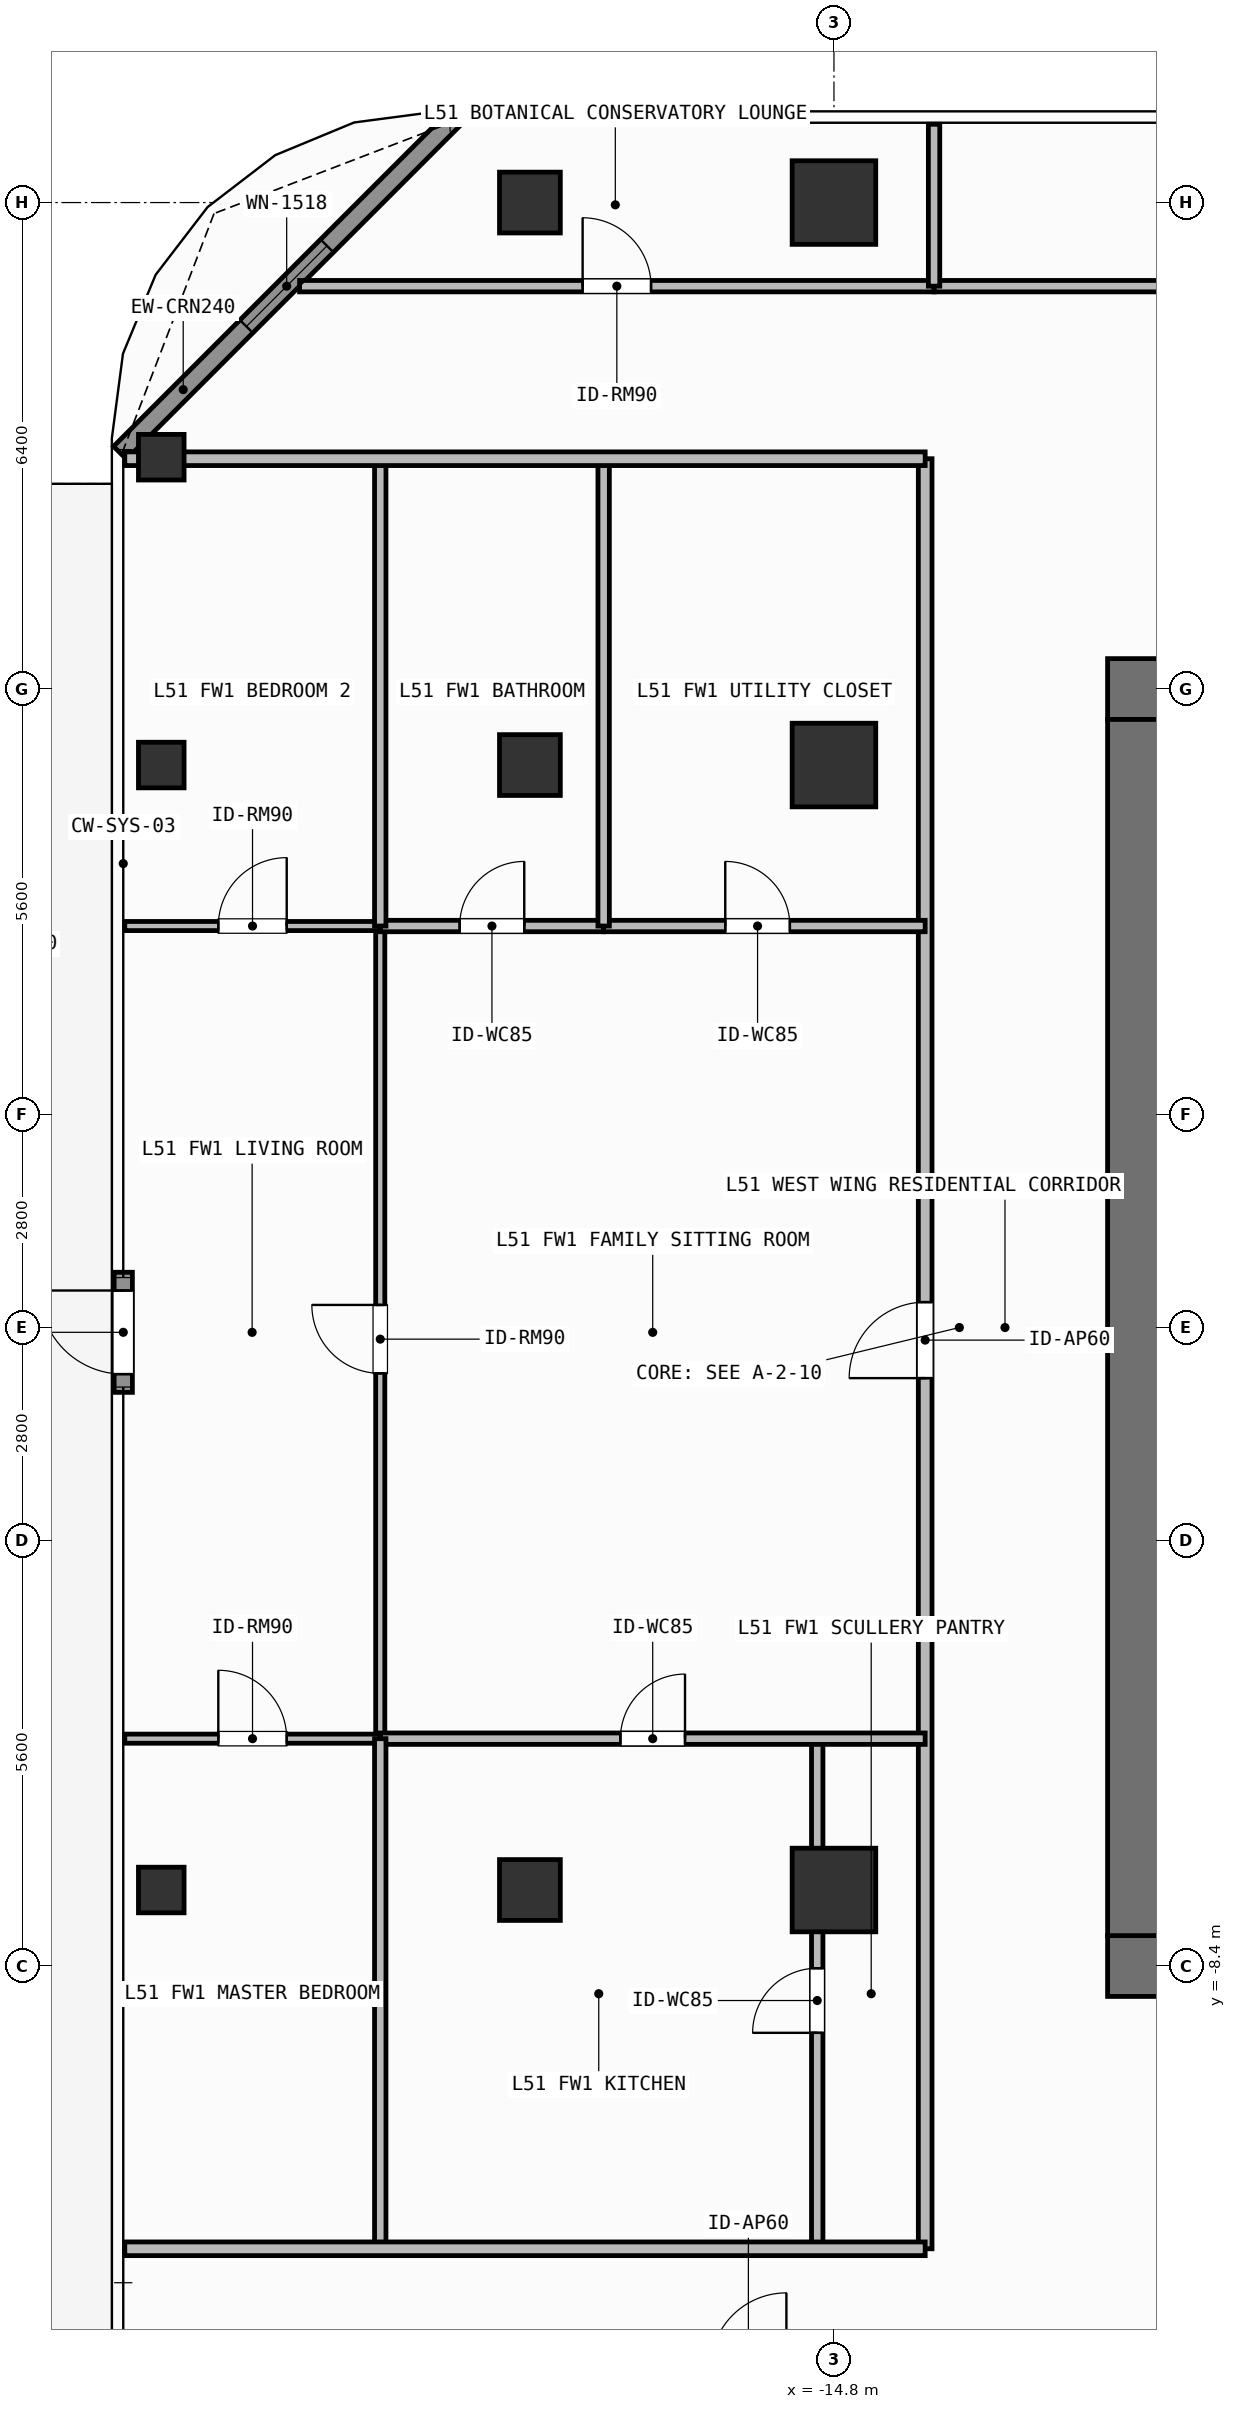
"""IFC4 building model, lengths in metres.
Left out: names, types, materials, properties, quantities, classifications, styles, units other than length and angle.
Written with IfcOpenShell. Run it as: python <this file> out.ifc"""

import sys

from ifc_helpers import new_model, si_unit, direction, frame, frame_2d, origin, origin_2d, place, context, subcontext, project, spatial, rectangle, hollow_rectangle, extrude, element, fill, save


model = new_model("IFC4")
c1 = context("Model", 3, precision=1e-05, world=origin(), true_north=direction((0.0, 1.0)))
c2 = subcontext(c1, "Body", "Model", "MODEL_VIEW")
j1 = project(units=[si_unit("LENGTHUNIT", "METRE"), si_unit("PLANEANGLEUNIT", "RADIAN")], contexts=[c1])
p1 = place(None, origin())
s1 = spatial("IfcSite", under=j1, at=p1, CompositionType="ELEMENT")
p2 = place(p1, origin())
s2 = spatial("IfcBuilding", under=s1, at=p2, CompositionType="ELEMENT")
p3 = place(p2, frame((0.0, 0.0, 207.0)))
s3 = spatial("IfcBuildingStorey", under=s2, at=p3, CompositionType="ELEMENT", Elevation=207.0)
for number, where, z_axis, x_axis in (
    (1, (-11.2, -8.4, 0.0), (0.0, 0.0, 1.0), (1.0, 0.0, 0.0)),
    (2, (-11.2, 8.4, 0.0), (0.0, 0.0, 1.0), (1.0, 0.0, 0.0)),
):
    element("IfcWall", number, at=place(p3, frame(where, z_axis=z_axis, x_axis=x_axis)), inside=s3, PredefinedType="SHEAR", context=c2, shape_type="SweptSolid", body=[
        extrude(rectangle(XDim=1.5, YDim=0.8, at=frame_2d((0.75, 0.0))), origin(), (0.0, 0.0, 1.0), 3.9),
    ])
p4 = place(p3, frame((-10.8, -8.0, 0.0), z_axis=(0.0, 0.0, 1.0), x_axis=(0.0, 1.0, 0.0)))
e3 = element("IfcWall", 3, at=p4, inside=s3, PredefinedType="SHEAR", context=c2, shape_type="SweptSolid", body=[
    extrude(rectangle(XDim=16.0, YDim=0.8, at=frame_2d((8.0, 0.0))), origin(), (0.0, 0.0, 1.0), 3.9),
])
for number, where, z_axis, x_axis in (
    (4, (-14.8, 14.8, 0.0), (0.0, 0.0, 1.0), (1.0, 0.0, 0.0)),
    (5, (-14.8, -7.4, 0.0), (0.0, 0.0, 1.0), (1.0, 0.0, 0.0)),
    (6, (-14.8, 7.4, 0.0), (0.0, 0.0, 1.0), (1.0, 0.0, 0.0)),
):
    element("IfcColumn", number, at=place(p3, frame(where, z_axis=z_axis, x_axis=x_axis)), inside=s3, PredefinedType="COLUMN", context=c2, shape_type="SweptSolid", body=[
        extrude(rectangle(XDim=1.1, YDim=1.1, at=origin_2d()), origin(), (0.0, 0.0, 1.0), 3.9),
    ])
for number, where, z_axis, x_axis in (
    (7, (-18.8, -7.4, 0.0), (0.0, 0.0, 1.0), (1.0, 0.0, 0.0)),
    (8, (-18.8, 7.4, 0.0), (0.0, 0.0, 1.0), (1.0, 0.0, 0.0)),
    (9, (-18.8, 14.8, 0.0), (0.0, 0.0, 1.0), (1.0, 0.0, 0.0)),
):
    element("IfcColumn", number, at=place(p3, frame(where, z_axis=z_axis, x_axis=x_axis)), inside=s3, PredefinedType="COLUMN", context=c2, shape_type="SweptSolid", body=[
        extrude(hollow_rectangle(XDim=0.8, YDim=0.8, WallThickness=0.036, at=origin_2d()), origin(), (0.0, 0.0, 1.0), 3.9),
    ])
for number, where, z_axis, x_axis in (
    (10, (-23.65, 11.45, 0.0), (0.0, 0.0, 1.0), (1.0, 0.0, 0.0)),
    (11, (-23.65, -7.4, 0.0), (0.0, 0.0, 1.0), (1.0, 0.0, 0.0)),
    (12, (-23.65, 7.4, 0.0), (0.0, 0.0, 1.0), (1.0, 0.0, 0.0)),
):
    element("IfcColumn", number, at=place(p3, frame(where, z_axis=z_axis, x_axis=x_axis)), inside=s3, PredefinedType="COLUMN", context=c2, shape_type="SweptSolid", body=[
        extrude(hollow_rectangle(XDim=0.6, YDim=0.6, WallThickness=0.028, at=origin_2d()), origin(), (0.0, 0.0, 1.0), 3.9),
    ])
p5 = place(p3, frame((-24.15, -0.853, 0.0), z_axis=(0.0, 0.0, 1.0), x_axis=(0.0, 1.0, 0.0)))
e13 = element("IfcWall", 13, at=p5, inside=s3, PredefinedType="SOLIDWALL", context=c2, shape_type="SweptSolid", body=[
    extrude(rectangle(XDim=1.58, YDim=0.24, at=frame_2d((0.79, 0.0))), origin(), (0.0, 0.0, 1.0), 3.62),
])
p6 = place(p5, frame((0.24, 0.0, 0.0)))
e14 = element("IfcOpeningElement", 14, at=p6, cuts=e13, PredefinedType="OPENING", context=c2, shape_type="SweptSolid", body=[
    extrude(rectangle(XDim=1.1, YDim=2.2, at=frame_2d((0.55, 1.1))), frame((0.0, 0.13, 0.0), z_axis=(0.0, -1.0, 0.0), x_axis=(1.0, 0.0, 0.0)), (0.0, 0.0, 1.0), 0.26),
])
p7 = place(p3, frame((-24.192, 11.508, 0.0), z_axis=(0.0, 0.0, 1.0), x_axis=(0.707106781187, 0.707106781187, 0.0)))
e15 = element("IfcWall", 15, at=p7, inside=s3, PredefinedType="SOLIDWALL", context=c2, shape_type="SweptSolid", body=[
    extrude(rectangle(XDim=6.201, YDim=0.24, at=frame_2d((3.101, 0.0))), origin(), (0.0, 0.0, 1.0), 3.62),
])
p8 = place(p7, frame((2.351, 0.0, 0.8)))
e16 = element("IfcOpeningElement", 16, at=p8, cuts=e15, PredefinedType="OPENING", context=c2, shape_type="SweptSolid", body=[
    extrude(rectangle(XDim=1.5, YDim=1.85, at=frame_2d((0.75, 0.925))), frame((0.0, 0.13, 0.0), z_axis=(0.0, -1.0, 0.0), x_axis=(1.0, 0.0, 0.0)), (0.0, 0.0, 1.0), 0.26),
])
p9 = place(p3, frame((-21.83, 13.7, 0.0), z_axis=(0.0, 0.0, 1.0), x_axis=(1.0, 0.0, 0.0)))
e17 = element("IfcWall", 17, at=p9, inside=s3, PredefinedType="PARTITIONING", context=c2, shape_type="SweptSolid", body=[
    extrude(rectangle(XDim=8.347, YDim=0.15, at=frame_2d((4.174, 0.0))), origin(), (0.0, 0.0, 1.0), 3.62),
])
p10 = place(p9, frame((3.723, 0.0, 0.0)))
e18 = element("IfcOpeningElement", 18, at=p10, cuts=e17, PredefinedType="OPENING", context=c2, shape_type="SweptSolid", body=[
    extrude(rectangle(XDim=0.9, YDim=2.1, at=frame_2d((0.45, 1.05))), frame((0.0, 0.085, 0.0), z_axis=(0.0, -1.0, 0.0), x_axis=(1.0, 0.0, 0.0)), (0.0, 0.0, 1.0), 0.17),
])
p11 = place(p3, frame((-13.483, 13.7, 0.0), z_axis=(0.0, 0.0, 1.0), x_axis=(1.0, 0.0, 0.0)))
e19 = element("IfcWall", 19, at=p11, inside=s3, PredefinedType="PARTITIONING", context=c2, shape_type="SweptSolid", body=[
    extrude(rectangle(XDim=13.58, YDim=0.15, at=frame_2d((6.79, 0.0))), origin(), (0.0, 0.0, 1.0), 3.62),
])
p12 = place(p11, frame((6.788, 0.0, 0.0)))
e20 = element("IfcOpeningElement", 20, at=p12, cuts=e19, PredefinedType="OPENING", context=c2, shape_type="SweptSolid", body=[
    extrude(rectangle(XDim=0.9, YDim=2.1, at=frame_2d((0.45, 1.05))), frame((0.0, 0.085, 0.0), z_axis=(0.0, -1.0, 0.0), x_axis=(1.0, 0.0, 0.0)), (0.0, 0.0, 1.0), 0.17),
])
p13 = place(p3, frame((-13.6, -12.12, 0.0), z_axis=(0.0, 0.0, 1.0), x_axis=(0.0, 1.0, 0.0)))
e21 = element("IfcWall", 21, at=p13, inside=s3, PredefinedType="PARTITIONING", context=c2, shape_type="SweptSolid", body=[
    extrude(rectangle(XDim=23.55, YDim=0.18, at=frame_2d((11.775, 0.0))), origin(), (0.0, 0.0, 1.0), 3.62),
])
p14 = place(p13, frame((11.454, 0.0, 0.0)))
e22 = element("IfcOpeningElement", 22, at=p14, cuts=e21, PredefinedType="OPENING", context=c2, shape_type="SweptSolid", body=[
    extrude(rectangle(XDim=1.0, YDim=2.2, at=frame_2d((0.5, 1.1))), frame((0.0, 0.1, 0.0), z_axis=(0.0, -1.0, 0.0), x_axis=(1.0, 0.0, 0.0)), (0.0, 0.0, 1.0), 0.2),
])
p15 = place(p3, frame((-20.769, -5.409, 0.0), z_axis=(0.0, 0.0, 1.0), x_axis=(0.0, 1.0, 0.0)))
e23 = element("IfcWall", 23, at=p15, inside=s3, PredefinedType="PARTITIONING", context=c2, shape_type="SweptSolid", body=[
    extrude(rectangle(XDim=10.691, YDim=0.12, at=frame_2d((5.345, 0.0))), origin(), (0.0, 0.0, 1.0), 3.62),
])
p16 = place(p15, frame((4.806, 0.0, 0.0)))
e24 = element("IfcOpeningElement", 24, at=p16, cuts=e23, PredefinedType="OPENING", context=c2, shape_type="SweptSolid", body=[
    extrude(rectangle(XDim=0.9, YDim=2.1, at=frame_2d((0.45, 1.05))), frame((0.0, 0.07, 0.0), z_axis=(0.0, -1.0, 0.0), x_axis=(1.0, 0.0, 0.0)), (0.0, 0.0, 1.0), 0.14),
])
p17 = place(p3, frame((-15.02, -12.12, 0.0), z_axis=(0.0, 0.0, 1.0), x_axis=(0.0, 1.0, 0.0)))
e25 = element("IfcWall", 25, at=p17, inside=s3, PredefinedType="PARTITIONING", context=c2, shape_type="SweptSolid", body=[
    extrude(rectangle(XDim=6.711, YDim=0.15, at=frame_2d((3.355, 0.0))), origin(), (0.0, 0.0, 1.0), 3.122),
])
p18 = place(p17, frame((2.841, 0.0, 0.0)))
e26 = element("IfcOpeningElement", 26, at=p18, cuts=e25, PredefinedType="OPENING", context=c2, shape_type="SweptSolid", body=[
    extrude(rectangle(XDim=0.85, YDim=2.1, at=frame_2d((0.425, 1.05))), frame((0.0, 0.085, 0.0), z_axis=(0.0, -1.0, 0.0), x_axis=(1.0, 0.0, 0.0)), (0.0, 0.0, 1.0), 0.17),
])
p19 = place(p3, frame((-20.769, 5.282, 0.0), z_axis=(0.0, 0.0, 1.0), x_axis=(1.0, 0.0, 0.0)))
e27 = element("IfcWall", 27, at=p19, inside=s3, PredefinedType="PARTITIONING", context=c2, shape_type="SweptSolid", body=[
    extrude(rectangle(XDim=2.939, YDim=0.15, at=frame_2d((1.469, 0.0))), origin(), (0.0, 0.0, 1.0), 3.62),
])
p20 = place(p19, frame((1.044, 0.0, 0.0)))
e28 = element("IfcOpeningElement", 28, at=p20, cuts=e27, PredefinedType="OPENING", context=c2, shape_type="SweptSolid", body=[
    extrude(rectangle(XDim=0.85, YDim=2.1, at=frame_2d((0.425, 1.05))), frame((0.0, 0.085, 0.0), z_axis=(0.0, -1.0, 0.0), x_axis=(1.0, 0.0, 0.0)), (0.0, 0.0, 1.0), 0.17),
])
p21 = place(p3, frame((-17.83, 5.282, 0.0), z_axis=(0.0, 0.0, 1.0), x_axis=(1.0, 0.0, 0.0)))
e29 = element("IfcWall", 29, at=p21, inside=s3, PredefinedType="PARTITIONING", context=c2, shape_type="SweptSolid", body=[
    extrude(rectangle(XDim=4.23, YDim=0.15, at=frame_2d((2.115, 0.0))), origin(), (0.0, 0.0, 1.0), 3.62),
])
p22 = place(p21, frame((1.6, 0.0, 0.0)))
e30 = element("IfcOpeningElement", 30, at=p22, cuts=e29, PredefinedType="OPENING", context=c2, shape_type="SweptSolid", body=[
    extrude(rectangle(XDim=0.85, YDim=2.1, at=frame_2d((0.425, 1.05))), frame((0.0, 0.085, 0.0), z_axis=(0.0, -1.0, 0.0), x_axis=(1.0, 0.0, 0.0)), (0.0, 0.0, 1.0), 0.17),
])
p23 = place(p3, frame((-20.769, -5.409, 0.0), z_axis=(0.0, 0.0, 1.0), x_axis=(1.0, 0.0, 0.0)))
e31 = element("IfcWall", 31, at=p23, inside=s3, PredefinedType="PARTITIONING", context=c2, shape_type="SweptSolid", body=[
    extrude(rectangle(XDim=7.169, YDim=0.15, at=frame_2d((3.584, 0.0))), origin(), (0.0, 0.0, 1.0), 3.62),
])
p24 = place(p23, frame((3.159, 0.0, 0.0)))
e32 = element("IfcOpeningElement", 32, at=p24, cuts=e31, PredefinedType="OPENING", context=c2, shape_type="SweptSolid", body=[
    extrude(rectangle(XDim=0.85, YDim=2.1, at=frame_2d((0.425, 1.05))), frame((0.0, 0.085, 0.0), z_axis=(0.0, -1.0, 0.0), x_axis=(1.0, 0.0, 0.0)), (0.0, 0.0, 1.0), 0.17),
])
p25 = place(p3, frame((-24.13, -5.409, 0.0), z_axis=(0.0, 0.0, 1.0), x_axis=(1.0, 0.0, 0.0)))
e33 = element("IfcWall", 33, at=p25, inside=s3, PredefinedType="PARTITIONING", context=c2, shape_type="SweptSolid", body=[
    extrude(rectangle(XDim=3.361, YDim=0.12, at=frame_2d((1.68, 0.0))), origin(), (0.0, 0.0, 1.0), 3.62),
])
p26 = place(p25, frame((1.23, 0.0, 0.0)))
e34 = element("IfcOpeningElement", 34, at=p26, cuts=e33, PredefinedType="OPENING", context=c2, shape_type="SweptSolid", body=[
    extrude(rectangle(XDim=0.9, YDim=2.1, at=frame_2d((0.45, 1.05))), frame((0.0, 0.07, 0.0), z_axis=(0.0, -1.0, 0.0), x_axis=(1.0, 0.0, 0.0)), (0.0, 0.0, 1.0), 0.14),
])
p27 = place(p3, frame((-24.13, 5.282, 0.0), z_axis=(0.0, 0.0, 1.0), x_axis=(1.0, 0.0, 0.0)))
e35 = element("IfcWall", 35, at=p27, inside=s3, PredefinedType="PARTITIONING", context=c2, shape_type="SweptSolid", body=[
    extrude(rectangle(XDim=3.361, YDim=0.12, at=frame_2d((1.68, 0.0))), origin(), (0.0, 0.0, 1.0), 3.62),
])
p28 = place(p27, frame((1.23, 0.0, 0.0)))
e36 = element("IfcOpeningElement", 36, at=p28, cuts=e35, PredefinedType="OPENING", context=c2, shape_type="SweptSolid", body=[
    extrude(rectangle(XDim=0.9, YDim=2.1, at=frame_2d((0.45, 1.05))), frame((0.0, 0.07, 0.0), z_axis=(0.0, -1.0, 0.0), x_axis=(1.0, 0.0, 0.0)), (0.0, 0.0, 1.0), 0.14),
])
p29 = place(p3, frame((-13.483, 13.7, 0.0), z_axis=(0.0, 0.0, 1.0), x_axis=(0.0, 1.0, 0.0)))
e37 = element("IfcWall", 37, at=p29, inside=s3, PredefinedType="PARTITIONING", context=c2, shape_type="SweptSolid", body=[
    extrude(rectangle(XDim=2.13, YDim=0.15, at=frame_2d((1.065, 0.0))), origin(), (0.0, 0.0, 1.0), 3.62),
])
p30 = place(p3, frame((-17.83, 5.282, 0.0), z_axis=(0.0, 0.0, 1.0), x_axis=(0.0, 1.0, 0.0)))
e38 = element("IfcWall", 38, at=p30, inside=s3, PredefinedType="PARTITIONING", context=c2, shape_type="SweptSolid", body=[
    extrude(rectangle(XDim=6.148, YDim=0.15, at=frame_2d((3.074, 0.0))), origin(), (0.0, 0.0, 1.0), 3.62),
])
p31 = place(p3, frame((-20.769, -12.12, 0.0), z_axis=(0.0, 0.0, 1.0), x_axis=(0.0, 1.0, 0.0)))
e39 = element("IfcWall", 39, at=p31, inside=s3, PredefinedType="PARTITIONING", context=c2, shape_type="SweptSolid", body=[
    extrude(rectangle(XDim=6.711, YDim=0.15, at=frame_2d((3.355, 0.0))), origin(), (0.0, 0.0, 1.0), 3.62),
])
p32 = place(p3, frame((-20.769, 5.282, 0.0), z_axis=(0.0, 0.0, 1.0), x_axis=(0.0, 1.0, 0.0)))
e40 = element("IfcWall", 40, at=p32, inside=s3, PredefinedType="PARTITIONING", context=c2, shape_type="SweptSolid", body=[
    extrude(rectangle(XDim=6.148, YDim=0.15, at=frame_2d((3.074, 0.0))), origin(), (0.0, 0.0, 1.0), 3.62),
])
p33 = place(p3, frame((-24.13, -12.12, 0.0), z_axis=(0.0, 0.0, 1.0), x_axis=(1.0, 0.0, 0.0)))
e41 = element("IfcWall", 41, at=p33, inside=s3, PredefinedType="PARTITIONING", context=c2, shape_type="SweptSolid", body=[
    extrude(rectangle(XDim=10.53, YDim=0.18, at=frame_2d((5.265, 0.0))), origin(), (0.0, 0.0, 1.0), 3.62),
])
p34 = place(p3, frame((-24.13, 11.43, 0.0), z_axis=(0.0, 0.0, 1.0), x_axis=(1.0, 0.0, 0.0)))
e42 = element("IfcWall", 42, at=p34, inside=s3, PredefinedType="PARTITIONING", context=c2, shape_type="SweptSolid", body=[
    extrude(rectangle(XDim=10.53, YDim=0.18, at=frame_2d((5.265, 0.0))), origin(), (0.0, 0.0, 1.0), 3.36),
])
p35 = place(p6, origin())
e43 = element("IfcDoor", 43, at=p35, inside=s3, OperationType="SINGLE_SWING_RIGHT", PredefinedType="DOOR", context=c2, shape_type="SweptSolid", body=[
    extrude(rectangle(XDim=1.1, YDim=2.2, at=frame_2d((0.55, 1.1))), frame((0.0, 0.025, 0.0), z_axis=(0.0, -1.0, 0.0), x_axis=(1.0, 0.0, 0.0)), (0.0, 0.0, 1.0), 0.05),
])
fill(e14, e43)
p36 = place(p8, origin())
e44 = element("IfcWindow", 44, at=p36, inside=s3, PartitioningType="SINGLE_PANEL", PredefinedType="WINDOW", context=c2, shape_type="SweptSolid", body=[
    extrude(rectangle(XDim=1.5, YDim=1.85, at=frame_2d((0.75, 0.925))), frame((0.0, 0.03, 0.0), z_axis=(0.0, -1.0, 0.0), x_axis=(1.0, 0.0, 0.0)), (0.0, 0.0, 1.0), 0.06),
])
fill(e16, e44)
p37 = place(p10, origin())
e45 = element("IfcDoor", 45, at=p37, inside=s3, OperationType="SINGLE_SWING_LEFT", PredefinedType="DOOR", context=c2, shape_type="SweptSolid", body=[
    extrude(rectangle(XDim=0.9, YDim=2.1, at=frame_2d((0.45, 1.05))), frame((0.0, 0.025, 0.0), z_axis=(0.0, -1.0, 0.0), x_axis=(1.0, 0.0, 0.0)), (0.0, 0.0, 1.0), 0.05),
])
fill(e18, e45)
p38 = place(p14, origin())
e46 = element("IfcDoor", 46, at=p38, inside=s3, OperationType="SINGLE_SWING_LEFT", PredefinedType="DOOR", context=c2, shape_type="SweptSolid", body=[
    extrude(rectangle(XDim=1.0, YDim=2.2, at=frame_2d((0.5, 1.1))), frame((0.0, 0.025, 0.0), z_axis=(0.0, -1.0, 0.0), x_axis=(1.0, 0.0, 0.0)), (0.0, 0.0, 1.0), 0.05),
])
fill(e22, e46)
p39 = place(p16, origin())
e47 = element("IfcDoor", 47, at=p39, inside=s3, OperationType="SINGLE_SWING_RIGHT", PredefinedType="DOOR", context=c2, shape_type="SweptSolid", body=[
    extrude(rectangle(XDim=0.9, YDim=2.1, at=frame_2d((0.45, 1.05))), frame((0.0, 0.025, 0.0), z_axis=(0.0, -1.0, 0.0), x_axis=(1.0, 0.0, 0.0)), (0.0, 0.0, 1.0), 0.05),
])
fill(e24, e47)
p40 = place(p18, origin())
e48 = element("IfcDoor", 48, at=p40, inside=s3, OperationType="SINGLE_SWING_LEFT", PredefinedType="DOOR", context=c2, shape_type="SweptSolid", body=[
    extrude(rectangle(XDim=0.85, YDim=2.1, at=frame_2d((0.425, 1.05))), frame((0.0, 0.025, 0.0), z_axis=(0.0, -1.0, 0.0), x_axis=(1.0, 0.0, 0.0)), (0.0, 0.0, 1.0), 0.05),
])
fill(e26, e48)
p41 = place(p20, origin())
e49 = element("IfcDoor", 49, at=p41, inside=s3, OperationType="SINGLE_SWING_RIGHT", PredefinedType="DOOR", context=c2, shape_type="SweptSolid", body=[
    extrude(rectangle(XDim=0.85, YDim=2.1, at=frame_2d((0.425, 1.05))), frame((0.0, 0.025, 0.0), z_axis=(0.0, -1.0, 0.0), x_axis=(1.0, 0.0, 0.0)), (0.0, 0.0, 1.0), 0.05),
])
fill(e28, e49)
p42 = place(p22, origin())
e50 = element("IfcDoor", 50, at=p42, inside=s3, OperationType="SINGLE_SWING_LEFT", PredefinedType="DOOR", context=c2, shape_type="SweptSolid", body=[
    extrude(rectangle(XDim=0.85, YDim=2.1, at=frame_2d((0.425, 1.05))), frame((0.0, 0.025, 0.0), z_axis=(0.0, -1.0, 0.0), x_axis=(1.0, 0.0, 0.0)), (0.0, 0.0, 1.0), 0.05),
])
fill(e30, e50)
p43 = place(p24, origin())
e51 = element("IfcDoor", 51, at=p43, inside=s3, OperationType="SINGLE_SWING_RIGHT", PredefinedType="DOOR", context=c2, shape_type="SweptSolid", body=[
    extrude(rectangle(XDim=0.85, YDim=2.1, at=frame_2d((0.425, 1.05))), frame((0.0, 0.025, 0.0), z_axis=(0.0, -1.0, 0.0), x_axis=(1.0, 0.0, 0.0)), (0.0, 0.0, 1.0), 0.05),
])
fill(e32, e51)
p44 = place(p26, origin())
e52 = element("IfcDoor", 52, at=p44, inside=s3, OperationType="SINGLE_SWING_LEFT", PredefinedType="DOOR", context=c2, shape_type="SweptSolid", body=[
    extrude(rectangle(XDim=0.9, YDim=2.1, at=frame_2d((0.45, 1.05))), frame((0.0, 0.025, 0.0), z_axis=(0.0, -1.0, 0.0), x_axis=(1.0, 0.0, 0.0)), (0.0, 0.0, 1.0), 0.05),
])
fill(e34, e52)
p45 = place(p28, origin())
e53 = element("IfcDoor", 53, at=p45, inside=s3, OperationType="SINGLE_SWING_RIGHT", PredefinedType="DOOR", context=c2, shape_type="SweptSolid", body=[
    extrude(rectangle(XDim=0.9, YDim=2.1, at=frame_2d((0.45, 1.05))), frame((0.0, 0.025, 0.0), z_axis=(0.0, -1.0, 0.0), x_axis=(1.0, 0.0, 0.0)), (0.0, 0.0, 1.0), 0.05),
])
fill(e36, e53)
save(model, sys.argv[1])
